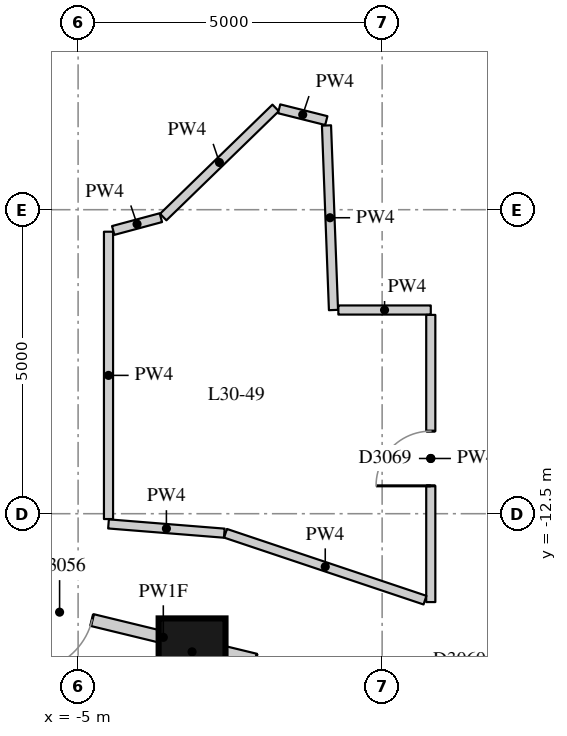
"""IFC4 building model, lengths in metres.
Left out: names, types, materials, properties, quantities, classifications, styles, units other than length and angle.
Written with IfcOpenShell. Run it as: python <this file> out.ifc"""

import sys

from ifc_helpers import new_model, si_unit, direction, frame, frame_2d, origin, origin_2d, place, context, subcontext, project, spatial, rectangle, extrude, element, fill, save


model = new_model("IFC4")
c1 = context("Model", 3, precision=1e-05, world=origin(), true_north=direction((0.0, 1.0)))
c2 = subcontext(c1, "Body", "Model", "MODEL_VIEW")
j1 = project(units=[si_unit("LENGTHUNIT", "METRE"), si_unit("PLANEANGLEUNIT", "RADIAN")], contexts=[c1])
p1 = place(None, origin())
s1 = spatial("IfcSite", under=j1, at=p1, CompositionType="ELEMENT")
p2 = place(p1, origin())
s2 = spatial("IfcBuilding", under=s1, at=p2, CompositionType="ELEMENT")
p3 = place(p2, frame((0.0, 0.0, 108.7)))
s3 = spatial("IfcBuildingStorey", under=s2, at=p3, CompositionType="ELEMENT", Elevation=108.7)
p4 = place(p3, frame((-3.126, -14.772, 0.0), z_axis=(0.0, 0.0, 1.0), x_axis=(1.0, 0.0, 0.0)))
e1 = element("IfcColumn", 1, at=p4, inside=s3, PredefinedType="COLUMN", context=c2, shape_type="SweptSolid", body=[
    extrude(rectangle(XDim=1.1, YDim=1.1, at=origin_2d()), origin(), (0.0, 0.0, 1.0), 3.3),
])
p5 = place(p3, frame((6.891, -14.625, 0.0), z_axis=(0.0, 0.0, 1.0), x_axis=(-0.987419134366, -0.158124802253, 0.0)))
e2 = element("IfcWall", 2, at=p5, inside=s3, PredefinedType="PARTITIONING", context=c2, shape_type="SweptSolid", body=[
    extrude(rectangle(XDim=6.168, YDim=0.2, at=frame_2d((3.084, 0.0))), origin(), (0.0, 0.0, 1.0), 2.42),
])
p6 = place(p5, frame((4.604, 0.0, 0.0)))
e3 = element("IfcOpeningElement", 3, at=p6, cuts=e2, PredefinedType="OPENING", context=c2, shape_type="SweptSolid", body=[
    extrude(rectangle(XDim=1.1, YDim=2.1, at=frame_2d((0.55, 1.05))), frame((0.0, 0.11, 0.0), z_axis=(0.0, -1.0, 0.0), x_axis=(1.0, 0.0, 0.0)), (0.0, 0.0, 1.0), 0.22),
])
p7 = place(p3, frame((0.702, -15.577, 0.0), z_axis=(0.0, 0.0, 1.0), x_axis=(-0.971804733873, 0.235787105715, 0.0)))
e4 = element("IfcWall", 4, at=p7, inside=s3, PredefinedType="PARTITIONING", context=c2, shape_type="SweptSolid", body=[
    extrude(rectangle(XDim=8.852, YDim=0.2, at=frame_2d((4.426, 0.0))), origin(), (0.0, 0.0, 1.0), 2.42),
])
p8 = place(p7, frame((5.631, 0.0, 0.0)))
e5 = element("IfcOpeningElement", 5, at=p8, cuts=e4, PredefinedType="OPENING", context=c2, shape_type="SweptSolid", body=[
    extrude(rectangle(XDim=1.1, YDim=2.1, at=frame_2d((0.55, 1.05))), frame((0.0, 0.11, 0.0), z_axis=(0.0, -1.0, 0.0), x_axis=(1.0, 0.0, 0.0)), (0.0, 0.0, 1.0), 0.22),
])
p9 = place(p7, frame((1.863, 0.0, 0.0)))
e6 = element("IfcOpeningElement", 6, at=p9, cuts=e4, PredefinedType="OPENING", context=c2, shape_type="SweptSolid", body=[
    extrude(rectangle(XDim=1.0, YDim=2.1, at=frame_2d((0.5, 1.05))), frame((0.0, 0.11, 0.0), z_axis=(0.0, -1.0, 0.0), x_axis=(1.0, 0.0, 0.0)), (0.0, 0.0, 1.0), 0.22),
])
p10 = place(p3, frame((-3.6, -7.621, 0.0), z_axis=(0.0, 0.0, 1.0), x_axis=(0.717359204099, 0.696703503862, 0.0)))
e7 = element("IfcWall", 7, at=p10, inside=s3, PredefinedType="PARTITIONING", context=c2, shape_type="SweptSolid", body=[
    extrude(rectangle(XDim=2.577, YDim=0.15, at=frame_2d((1.288, 0.0))), origin(), (0.0, 0.0, 1.0), 3.02),
])
p11 = place(p3, frame((-1.694, -5.84, 0.0), z_axis=(0.0, 0.0, 1.0), x_axis=(0.970106576928, -0.242679272705, 0.0)))
e8 = element("IfcWall", 8, at=p11, inside=s3, PredefinedType="PARTITIONING", context=c2, shape_type="SweptSolid", body=[
    extrude(rectangle(XDim=0.8, YDim=0.15, at=frame_2d((0.4, 0.0))), origin(), (0.0, 0.0, 1.0), 3.02),
])
p12 = place(p3, frame((-0.915, -6.115, 0.0), z_axis=(0.0, 0.0, 1.0), x_axis=(0.037855898917, -0.999283208564, 0.0)))
e9 = element("IfcWall", 9, at=p12, inside=s3, PredefinedType="PARTITIONING", context=c2, shape_type="SweptSolid", body=[
    extrude(rectangle(XDim=3.038, YDim=0.15, at=frame_2d((1.519, 0.0))), origin(), (0.0, 0.0, 1.0), 3.02),
])
p13 = place(p3, frame((-0.72, -9.15, 0.0), z_axis=(0.0, 0.0, 1.0), x_axis=(1.0, 0.0, 0.0)))
e10 = element("IfcWall", 10, at=p13, inside=s3, PredefinedType="PARTITIONING", context=c2, shape_type="SweptSolid", body=[
    extrude(rectangle(XDim=1.52, YDim=0.15, at=frame_2d((0.76, 0.0))), origin(), (0.0, 0.0, 1.0), 3.02),
])
p14 = place(p3, frame((0.8, -9.23, 0.0), z_axis=(0.0, 0.0, 1.0), x_axis=(0.0, -1.0, 0.0)))
e11 = element("IfcWall", 11, at=p14, inside=s3, PredefinedType="PARTITIONING", context=c2, shape_type="SweptSolid", body=[
    extrude(rectangle(XDim=4.724, YDim=0.15, at=frame_2d((2.362, 0.0))), origin(), (0.0, 0.0, 1.0), 3.02),
])
p15 = place(p14, frame((1.912, 0.0, 0.0)))
e12 = element("IfcOpeningElement", 12, at=p15, cuts=e11, PredefinedType="OPENING", context=c2, shape_type="SweptSolid", body=[
    extrude(rectangle(XDim=0.9, YDim=2.1, at=frame_2d((0.45, 1.05))), frame((0.0, 0.085, 0.0), z_axis=(0.0, -1.0, 0.0), x_axis=(1.0, 0.0, 0.0)), (0.0, 0.0, 1.0), 0.17),
])
p16 = place(p3, frame((0.705, -13.922, 0.0), z_axis=(0.0, 0.0, 1.0), x_axis=(-0.948131483463, 0.317878420258, 0.0)))
e13 = element("IfcWall", 13, at=p16, inside=s3, PredefinedType="PARTITIONING", context=c2, shape_type="SweptSolid", body=[
    extrude(rectangle(XDim=3.46, YDim=0.15, at=frame_2d((1.73, 0.0))), origin(), (0.0, 0.0, 1.0), 3.02),
])
p17 = place(p3, frame((-2.596, -12.82, 0.0), z_axis=(0.0, 0.0, 1.0), x_axis=(-0.996815278536, 0.079745222283, 0.0)))
e14 = element("IfcWall", 14, at=p17, inside=s3, PredefinedType="PARTITIONING", context=c2, shape_type="SweptSolid", body=[
    extrude(rectangle(XDim=1.91, YDim=0.15, at=frame_2d((0.955, 0.0))), origin(), (0.0, 0.0, 1.0), 3.02),
])
p18 = place(p3, frame((-4.5, -12.588, 0.0), z_axis=(0.0, 0.0, 1.0), x_axis=(0.0, 1.0, 0.0)))
e15 = element("IfcWall", 15, at=p18, inside=s3, PredefinedType="PARTITIONING", context=c2, shape_type="SweptSolid", body=[
    extrude(rectangle(XDim=4.726, YDim=0.15, at=frame_2d((2.363, 0.0))), origin(), (0.0, 0.0, 1.0), 3.02),
])
p19 = place(p3, frame((-4.423, -7.842, 0.0), z_axis=(0.0, 0.0, 1.0), x_axis=(0.96582447955, 0.259196980502, 0.0)))
e16 = element("IfcWall", 16, at=p19, inside=s3, PredefinedType="PARTITIONING", context=c2, shape_type="SweptSolid", body=[
    extrude(rectangle(XDim=0.812, YDim=0.15, at=frame_2d((0.406, 0.0))), origin(), (0.0, 0.0, 1.0), 3.02),
])
p20 = place(p3, frame((-4.073, -3.927, 0.0), z_axis=(0.0, 0.0, 1.0), x_axis=(-0.923860025149, -0.382730523909, 0.0)))
e17 = element("IfcWall", 17, at=p20, inside=s3, PredefinedType="PARTITIONING", context=c2, shape_type="SweptSolid", body=[
    extrude(rectangle(XDim=4.251, YDim=0.1, at=frame_2d((2.125, 0.0))), origin(), (0.0, 0.0, 1.0), 3.02),
])
p21 = place(p8, origin())
e18 = element("IfcDoor", 18, at=p21, inside=s3, OperationType="SINGLE_SWING_RIGHT", PredefinedType="DOOR", context=c2, shape_type="SweptSolid", body=[
    extrude(rectangle(XDim=1.1, YDim=2.1, at=frame_2d((0.55, 1.05))), frame((0.0, 0.025, 0.0), z_axis=(0.0, -1.0, 0.0), x_axis=(1.0, 0.0, 0.0)), (0.0, 0.0, 1.0), 0.05),
])
fill(e5, e18)
p22 = place(p15, origin())
e19 = element("IfcDoor", 19, at=p22, inside=s3, OperationType="SINGLE_SWING_LEFT", PredefinedType="DOOR", context=c2, shape_type="SweptSolid", body=[
    extrude(rectangle(XDim=0.9, YDim=2.1, at=frame_2d((0.45, 1.05))), frame((0.0, 0.025, 0.0), z_axis=(0.0, -1.0, 0.0), x_axis=(1.0, 0.0, 0.0)), (0.0, 0.0, 1.0), 0.05),
])
fill(e12, e19)
save(model, sys.argv[1])
